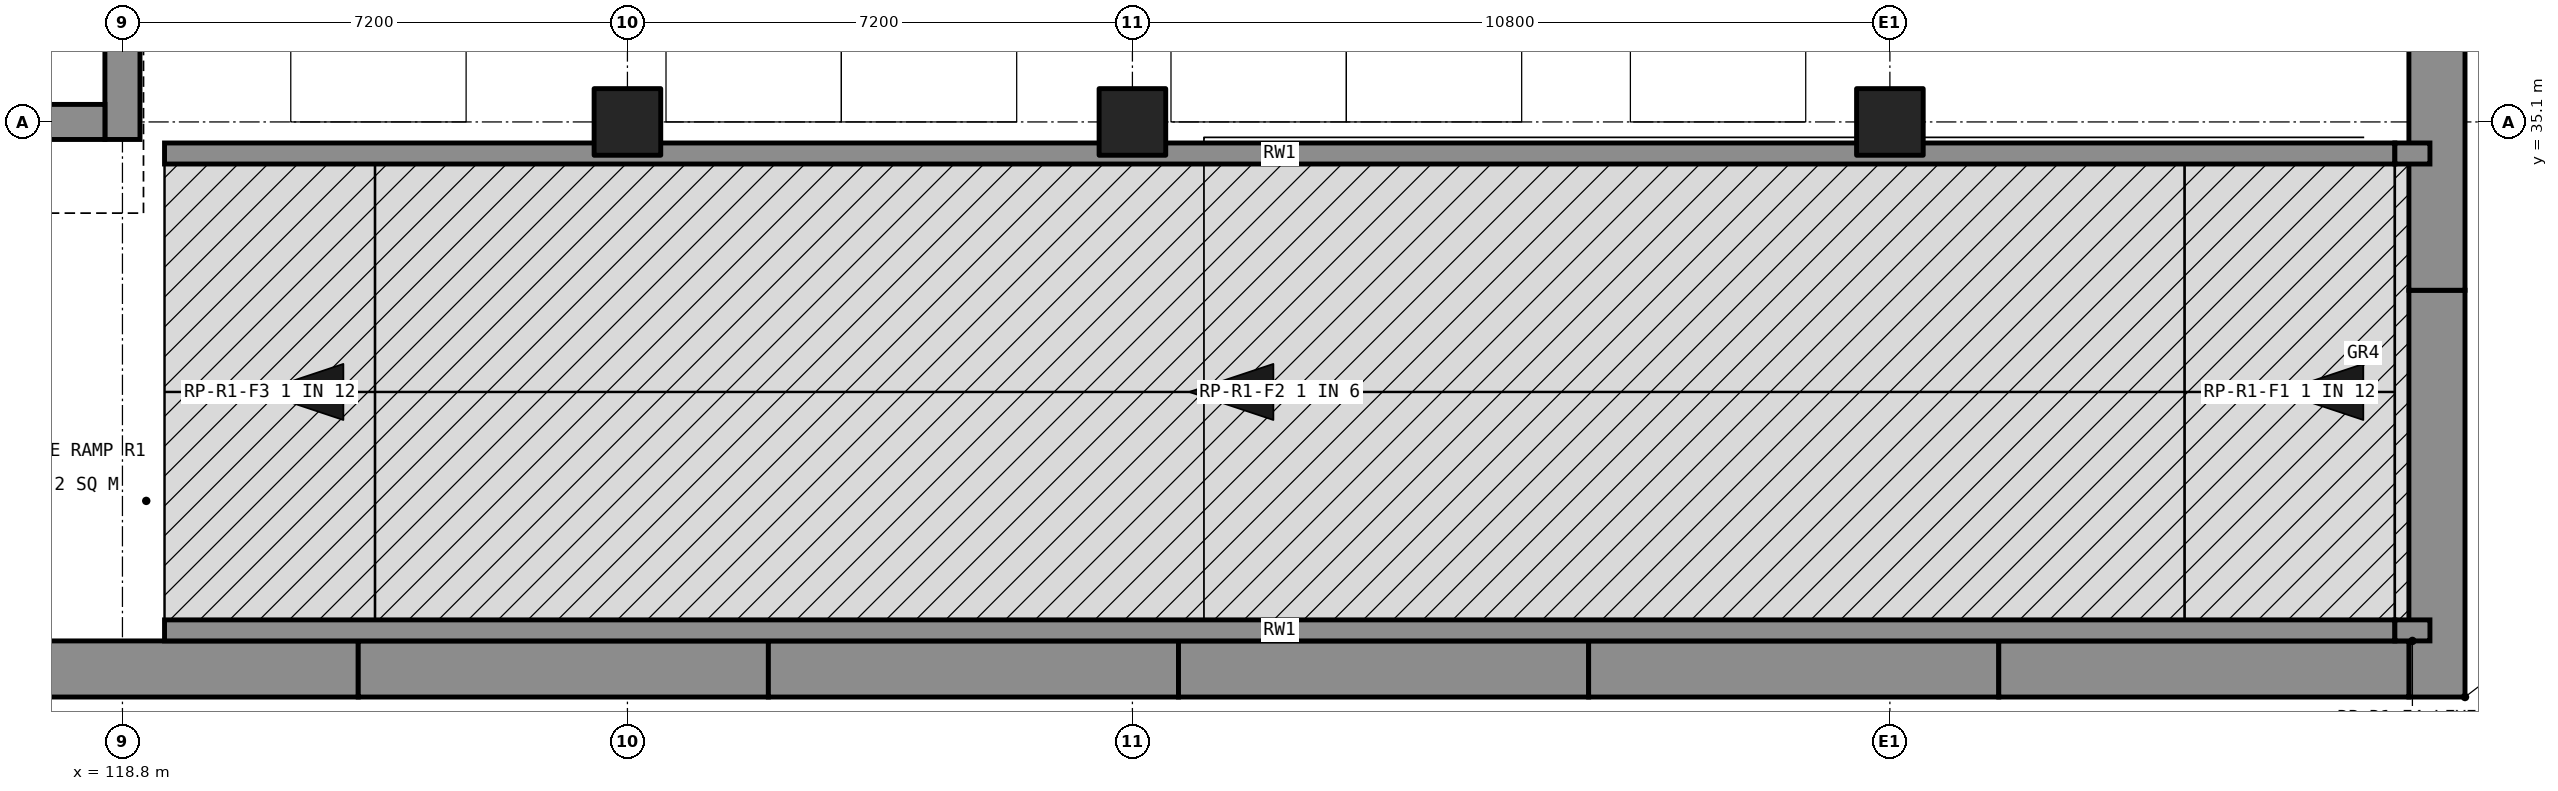
"""IFC4 building model, lengths in metres.
Left out: names, types, materials, properties, quantities, classifications, styles, units other than length and angle.
Written with IfcOpenShell. Run it as: python <this file> out.ifc"""

import sys

from ifc_helpers import new_model, si_unit, direction, frame, frame_2d, origin, origin_2d, place, context, subcontext, project, spatial, polyline, rectangle, outline, extrude, element, save


model = new_model("IFC4")
c1 = context("Model", 3, precision=1e-05, world=origin(), true_north=direction((0.0, 1.0)))
c2 = subcontext(c1, "Body", "Model", "MODEL_VIEW")
j1 = project(units=[si_unit("LENGTHUNIT", "METRE"), si_unit("PLANEANGLEUNIT", "RADIAN")], contexts=[c1])
p1 = place(None, origin())
s1 = spatial("IfcSite", under=j1, at=p1, CompositionType="ELEMENT")
p2 = place(p1, origin())
s2 = spatial("IfcBuilding", under=s1, at=p2, CompositionType="ELEMENT")
p3 = place(p2, frame((0.0, 0.0, -4.8)))
s3 = spatial("IfcBuildingStorey", under=s2, at=p3, CompositionType="ELEMENT", Elevation=-4.8)
for number, where, z_axis, x_axis in (
    (1, (126.0, 35.1, 0.0), (0.0, 0.0, 1.0), (1.0, 0.0, 0.0)),
    (2, (133.2, 35.1, 0.0), (0.0, 0.0, 1.0), (1.0, 0.0, 0.0)),
    (3, (144.0, 35.1, 0.0), (0.0, 0.0, 1.0), (1.0, 0.0, 0.0)),
):
    element("IfcColumn", number, at=place(p3, frame(where, z_axis=z_axis, x_axis=x_axis)), inside=s3, PredefinedType="COLUMN", context=c2, shape_type="SweptSolid", body=[
        extrude(rectangle(XDim=0.95, YDim=0.95, at=origin_2d()), origin(), (0.0, 0.0, 1.0), 4.35),
    ])
for number, where, z_axis, x_axis in (
    (4, (151.8, 26.9, -18.2), (0.0, 0.0, 1.0), (0.0, 1.0, 0.0)),
    (5, (151.8, 32.7, -18.2), (0.0, 0.0, 1.0), (0.0, 1.0, 0.0)),
):
    element("IfcWall", number, at=place(p3, frame(where, z_axis=z_axis, x_axis=x_axis)), inside=s3, PredefinedType="SOLIDWALL", context=c2, shape_type="SweptSolid", body=[
        extrude(rectangle(XDim=5.8, YDim=0.8, at=frame_2d((2.9, 0.0))), origin(), (0.0, 0.0, 1.0), 21.55),
    ])
for number, where, z_axis, x_axis in (
    (6, (116.314, 27.3, -18.2), (0.0, 0.0, 1.0), (1.0, 0.0, 0.0)),
    (7, (122.162, 27.3, -18.2), (0.0, 0.0, 1.0), (1.0, 0.0, 0.0)),
    (8, (128.01, 27.3, -18.2), (0.0, 0.0, 1.0), (1.0, 0.0, 0.0)),
    (9, (133.857, 27.3, -18.2), (0.0, 0.0, 1.0), (1.0, 0.0, 0.0)),
    (10, (139.705, 27.3, -18.2), (0.0, 0.0, 1.0), (1.0, 0.0, 0.0)),
):
    element("IfcWall", number, at=place(p3, frame(where, z_axis=z_axis, x_axis=x_axis)), inside=s3, PredefinedType="SOLIDWALL", context=c2, shape_type="SweptSolid", body=[
        extrude(rectangle(XDim=5.848, YDim=0.8, at=frame_2d((2.924, 0.0))), origin(), (0.0, 0.0, 1.0), 21.55),
    ])
p4 = place(p3, frame((145.552, 27.3, -18.2), z_axis=(0.0, 0.0, 1.0), x_axis=(1.0, 0.0, 0.0)))
e11 = element("IfcWall", 11, at=p4, inside=s3, PredefinedType="SOLIDWALL", context=c2, shape_type="SweptSolid", body=[
    extrude(rectangle(XDim=5.847, YDim=0.8, at=frame_2d((2.924, 0.0))), origin(), (0.0, 0.0, 1.0), 21.55),
])
p5 = place(p3, frame((118.8, 34.85, 0.0), z_axis=(0.0, 0.0, 1.0), x_axis=(0.0, 1.0, 0.0)))
e12 = element("IfcWall", 12, at=p5, inside=s3, PredefinedType="SHEAR", context=c2, shape_type="SweptSolid", body=[
    extrude(rectangle(XDim=11.3, YDim=0.5, at=frame_2d((5.65, 0.0))), origin(), (0.0, 0.0, 1.0), 4.5),
])
p6 = place(p3, frame((118.55, 35.1, 0.0), z_axis=(0.0, 0.0, 1.0), x_axis=(-1.0, 0.0, 0.0)))
e13 = element("IfcWall", 13, at=p6, inside=s3, PredefinedType="SHEAR", context=c2, shape_type="SweptSolid", body=[
    extrude(rectangle(XDim=4.0, YDim=0.5, at=frame_2d((2.0, 0.0))), origin(), (0.0, 0.0, 1.0), 4.5),
])
for number, where, z_axis, x_axis in (
    (14, (151.2, 27.85, 0.0), (0.0, 0.0, 1.0), (-1.0, 0.0, 0.0)),
    (15, (151.2, 34.65, 0.0), (0.0, 0.0, 1.0), (-1.0, 0.0, 0.0)),
):
    element("IfcWall", number, at=place(p3, frame(where, z_axis=z_axis, x_axis=x_axis)), inside=s3, PredefinedType="SOLIDWALL", context=c2, shape_type="SweptSolid", body=[
        extrude(outline(polyline([(0.0, 0.0), (31.8, 0.0), (31.8, 1.1), (31.0, 1.167), (30.0, 1.25), (29.0, 1.333), (28.8, 1.35), (28.0, 1.483), (27.0, 1.65), (26.0, 1.817), (25.0, 1.983), (24.0, 2.15), (23.0, 2.317), (22.0, 2.483), (21.0, 2.65), (20.0, 2.817), (19.0, 2.983), (18.0, 3.15), (17.0, 3.317), (16.9, 3.333), (16.0, 3.483), (15.0, 3.65), (14.0, 3.817), (13.0, 3.983), (12.0, 4.15), (11.0, 4.317), (10.0, 4.483), (9.0, 4.65), (8.0, 4.817), (7.0, 4.983), (6.0, 5.15), (5.0, 5.317), (4.0, 5.483), (3.0, 5.65), (2.0, 5.733), (1.0, 5.817), (0.0, 5.9), (0.0, 0.0)])), frame((0.0, 0.15, 0.0), z_axis=(0.0, -1.0, 0.0), x_axis=(1.0, 0.0, 0.0)), (0.0, 0.0, 1.0), 0.3),
    ])
for number, where, z_axis, x_axis in (
    (16, (151.2, 27.85, 4.8), (0.0, 0.0, 1.0), (1.0, 0.0, 0.0)),
    (17, (151.2, 34.65, 4.8), (0.0, 0.0, 1.0), (1.0, 0.0, 0.0)),
):
    element("IfcWall", number, at=place(p3, frame(where, z_axis=z_axis, x_axis=x_axis)), inside=s3, PredefinedType="SOLIDWALL", context=c2, shape_type="SweptSolid", body=[
        extrude(rectangle(XDim=0.5, YDim=0.3, at=frame_2d((0.25, 0.0))), origin(), (0.0, 0.0, 1.0), 1.1),
    ])
save(model, sys.argv[1])
